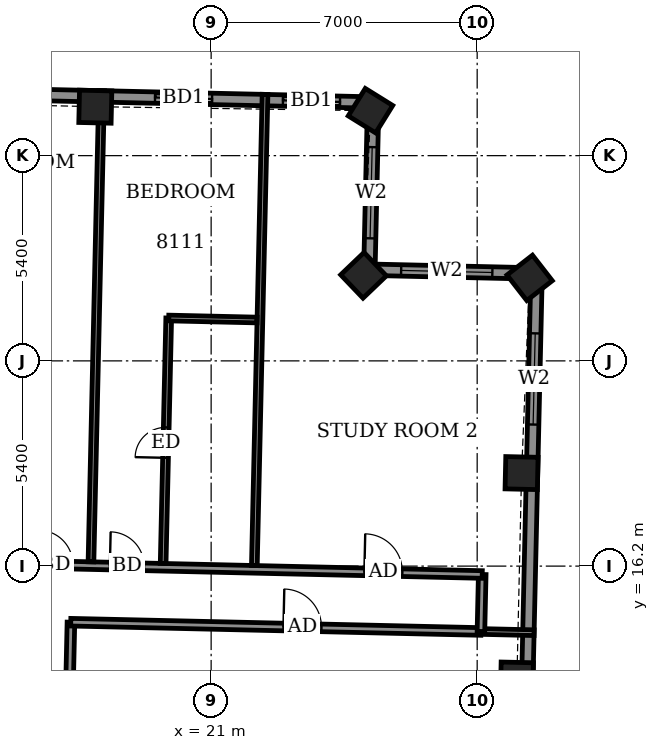
"""IFC4 building model, lengths in metres.
Left out: names, types, materials, properties, quantities, classifications, styles, units other than length and angle.
Written with IfcOpenShell. Run it as: python <this file> out.ifc"""

import sys

from ifc_helpers import new_model, si_unit, direction, frame, frame_2d, origin, origin_2d, place, context, subcontext, project, spatial, rectangle, extrude, element, fill, save


model = new_model("IFC4")
c1 = context("Model", 3, precision=1e-05, world=origin(), true_north=direction((0.0, 1.0)))
c2 = subcontext(c1, "Body", "Model", "MODEL_VIEW")
j1 = project(units=[si_unit("LENGTHUNIT", "METRE"), si_unit("PLANEANGLEUNIT", "RADIAN")], contexts=[c1])
p1 = place(None, origin())
s1 = spatial("IfcSite", under=j1, at=p1, CompositionType="ELEMENT")
p2 = place(p1, origin())
s2 = spatial("IfcBuilding", under=s1, at=p2, CompositionType="ELEMENT")
p3 = place(p2, frame((0.0, 0.0, 316.9)))
s3 = spatial("IfcBuildingStorey", under=s2, at=p3, CompositionType="ELEMENT", Elevation=316.9)
for number, where, z_axis, x_axis in (
    (1, (29.046, 13.242, -0.55), (0.0, 0.0, 1.0), (0.023, 1.0, 0.0)),
    (2, (29.168, 18.648, -0.55), (0.0, 0.0, 1.0), (0.023, 1.0, 0.0)),
    (3, (29.38, 23.784, -0.55), (0.0, 0.0, 1.0), (-0.613, 0.79, 0.0)),
    (4, (25.01, 23.851, -0.55), (0.0, 0.0, 1.0), (-0.691, 0.723, 0.0)),
    (5, (25.193, 28.183, -0.55), (0.0, 0.0, 1.0), (-0.849, 0.528, 0.0)),
    (6, (17.952, 28.288, -0.55), (0.0, 0.0, 1.0), (-1.0, 0.023, 0.0)),
):
    element("IfcColumn", number, at=place(p3, frame(where, z_axis=z_axis, x_axis=x_axis)), inside=s3, PredefinedType="COLUMN", context=c2, shape_type="SweptSolid", body=[
        extrude(rectangle(XDim=0.85, YDim=0.85, at=origin_2d()), origin(), (0.0, 0.0, 1.0), 3.6),
    ])
p4 = place(p3, frame((29.188, 7.404, 0.0), z_axis=(0.0, 0.0, 1.0), x_axis=(0.022728463996, 0.999741675096, 0.0)))
e7 = element("IfcWall", 7, at=p4, inside=s3, PredefinedType="SOLIDWALL", context=c2, shape_type="SweptSolid", body=[
    extrude(rectangle(XDim=16.499, YDim=0.3, at=frame_2d((8.25, 0.0))), origin(), (0.0, 0.0, 1.0), 2.55),
])
p5 = place(p4, frame((1.563, 0.0, 0.0)))
e8 = element("IfcOpeningElement", 8, at=p5, cuts=e7, PredefinedType="OPENING", context=c2, shape_type="SweptSolid", body=[
    extrude(rectangle(XDim=1.5, YDim=2.4, at=frame_2d((0.75, 1.2))), frame((0.0, 0.16, 0.0), z_axis=(0.0, -1.0, 0.0), x_axis=(1.0, 0.0, 0.0)), (0.0, 0.0, 1.0), 0.32),
])
p6 = place(p4, frame((4.367, 0.0, 0.9)))
e9 = element("IfcOpeningElement", 9, at=p6, cuts=e7, PredefinedType="OPENING", context=c2, shape_type="SweptSolid", body=[
    extrude(rectangle(XDim=0.9, YDim=1.5, at=frame_2d((0.45, 0.75))), frame((0.0, 0.16, 0.0), z_axis=(0.0, -1.0, 0.0), x_axis=(1.0, 0.0, 0.0)), (0.0, 0.0, 1.0), 0.32),
])
p7 = place(p4, frame((12.524, 0.0, 0.9)))
e10 = element("IfcOpeningElement", 10, at=p7, cuts=e7, PredefinedType="OPENING", context=c2, shape_type="SweptSolid", body=[
    extrude(rectangle(XDim=2.4, YDim=1.5, at=frame_2d((1.2, 0.75))), frame((0.0, 0.16, 0.0), z_axis=(0.0, -1.0, 0.0), x_axis=(1.0, 0.0, 0.0)), (0.0, 0.0, 1.0), 0.32),
])
p8 = place(p3, frame((29.563, 23.899, 0.0), z_axis=(0.0, 0.0, 1.0), x_axis=(-0.999741204967, 0.022749133868, 0.0)))
e11 = element("IfcWall", 11, at=p8, inside=s3, PredefinedType="SOLIDWALL", context=c2, shape_type="SweptSolid", body=[
    extrude(rectangle(XDim=4.4, YDim=0.3, at=frame_2d((2.2, 0.0))), origin(), (0.0, 0.0, 1.0), 2.55),
])
p9 = place(p8, frame((1.164, 0.0, 0.9)))
e12 = element("IfcOpeningElement", 12, at=p9, cuts=e11, PredefinedType="OPENING", context=c2, shape_type="SweptSolid", body=[
    extrude(rectangle(XDim=2.4, YDim=1.5, at=frame_2d((1.2, 0.75))), frame((0.0, 0.16, 0.0), z_axis=(0.0, -1.0, 0.0), x_axis=(1.0, 0.0, 0.0)), (0.0, 0.0, 1.0), 0.32),
])
p10 = place(p3, frame((25.164, 23.999, 0.0), z_axis=(0.0, 0.0, 1.0), x_axis=(0.02269871331, 0.999742351016, 0.0)))
e13 = element("IfcWall", 13, at=p10, inside=s3, PredefinedType="SOLIDWALL", context=c2, shape_type="SweptSolid", body=[
    extrude(rectangle(XDim=4.399, YDim=0.3, at=frame_2d((2.2, 0.0))), origin(), (0.0, 0.0, 1.0), 2.55),
])
p11 = place(p10, frame((0.826, 0.0, 0.9)))
e14 = element("IfcOpeningElement", 14, at=p11, cuts=e13, PredefinedType="OPENING", context=c2, shape_type="SweptSolid", body=[
    extrude(rectangle(XDim=2.4, YDim=1.5, at=frame_2d((1.2, 0.75))), frame((0.0, 0.16, 0.0), z_axis=(0.0, -1.0, 0.0), x_axis=(1.0, 0.0, 0.0)), (0.0, 0.0, 1.0), 0.32),
])
p12 = place(p3, frame((25.264, 28.397, 0.0), z_axis=(0.0, 0.0, 1.0), x_axis=(-0.999742391375, 0.022696935658, 0.0)))
e15 = element("IfcWall", 15, at=p12, inside=s3, PredefinedType="SOLIDWALL", context=c2, shape_type="SweptSolid", body=[
    extrude(rectangle(XDim=51.9, YDim=0.3, at=frame_2d((25.95, 0.0))), origin(), (0.0, 0.0, 1.0), 2.45),
])
p13 = place(p12, frame((0.874, 0.0, 0.0)))
e16 = element("IfcOpeningElement", 16, at=p13, cuts=e15, PredefinedType="OPENING", context=c2, shape_type="SweptSolid", body=[
    extrude(rectangle(XDim=1.5, YDim=2.4, at=frame_2d((0.75, 1.2))), frame((0.0, 0.16, 0.0), z_axis=(0.0, -1.0, 0.0), x_axis=(1.0, 0.0, 0.0)), (0.0, 0.0, 1.0), 0.32),
])
p14 = place(p12, frame((4.241, 0.0, 0.0)))
e17 = element("IfcOpeningElement", 17, at=p14, cuts=e15, PredefinedType="OPENING", context=c2, shape_type="SweptSolid", body=[
    extrude(rectangle(XDim=1.5, YDim=2.4, at=frame_2d((0.75, 1.2))), frame((0.0, 0.16, 0.0), z_axis=(0.0, -1.0, 0.0), x_axis=(1.0, 0.0, 0.0)), (0.0, 0.0, 1.0), 0.32),
])
p15 = place(p12, frame((8.691, 0.0, 0.0)))
e18 = element("IfcOpeningElement", 18, at=p15, cuts=e15, PredefinedType="OPENING", context=c2, shape_type="SweptSolid", body=[
    extrude(rectangle(XDim=1.5, YDim=2.4, at=frame_2d((0.75, 1.2))), frame((0.0, 0.16, 0.0), z_axis=(0.0, -1.0, 0.0), x_axis=(1.0, 0.0, 0.0)), (0.0, 0.0, 1.0), 0.32),
])
p16 = place(p12, frame((12.245, 0.0, 0.0)))
e19 = element("IfcOpeningElement", 19, at=p16, cuts=e15, PredefinedType="OPENING", context=c2, shape_type="SweptSolid", body=[
    extrude(rectangle(XDim=1.5, YDim=2.4, at=frame_2d((0.75, 1.2))), frame((0.0, 0.16, 0.0), z_axis=(0.0, -1.0, 0.0), x_axis=(1.0, 0.0, 0.0)), (0.0, 0.0, 1.0), 0.32),
])
p17 = place(p12, frame((17.25, 0.0, 0.0)))
e20 = element("IfcOpeningElement", 20, at=p17, cuts=e15, PredefinedType="OPENING", context=c2, shape_type="SweptSolid", body=[
    extrude(rectangle(XDim=1.5, YDim=2.4, at=frame_2d((0.75, 1.2))), frame((0.0, 0.16, 0.0), z_axis=(0.0, -1.0, 0.0), x_axis=(1.0, 0.0, 0.0)), (0.0, 0.0, 1.0), 0.32),
])
p18 = place(p12, frame((22.874, 0.0, 0.0)))
e21 = element("IfcOpeningElement", 21, at=p18, cuts=e15, PredefinedType="OPENING", context=c2, shape_type="SweptSolid", body=[
    extrude(rectangle(XDim=1.2, YDim=2.4, at=frame_2d((0.6, 1.2))), frame((0.0, 0.16, 0.0), z_axis=(0.0, -1.0, 0.0), x_axis=(1.0, 0.0, 0.0)), (0.0, 0.0, 1.0), 0.32),
])
p19 = place(p12, frame((26.1, 0.0, 0.0)))
e22 = element("IfcOpeningElement", 22, at=p19, cuts=e15, PredefinedType="OPENING", context=c2, shape_type="SweptSolid", body=[
    extrude(rectangle(XDim=1.5, YDim=2.4, at=frame_2d((0.75, 1.2))), frame((0.0, 0.16, 0.0), z_axis=(0.0, -1.0, 0.0), x_axis=(1.0, 0.0, 0.0)), (0.0, 0.0, 1.0), 0.32),
])
p20 = place(p12, frame((30.977, 0.0, 0.0)))
e23 = element("IfcOpeningElement", 23, at=p20, cuts=e15, PredefinedType="OPENING", context=c2, shape_type="SweptSolid", body=[
    extrude(rectangle(XDim=1.5, YDim=2.4, at=frame_2d((0.75, 1.2))), frame((0.0, 0.16, 0.0), z_axis=(0.0, -1.0, 0.0), x_axis=(1.0, 0.0, 0.0)), (0.0, 0.0, 1.0), 0.32),
])
p21 = place(p12, frame((34.53, 0.0, 0.0)))
e24 = element("IfcOpeningElement", 24, at=p21, cuts=e15, PredefinedType="OPENING", context=c2, shape_type="SweptSolid", body=[
    extrude(rectangle(XDim=1.5, YDim=2.4, at=frame_2d((0.75, 1.2))), frame((0.0, 0.16, 0.0), z_axis=(0.0, -1.0, 0.0), x_axis=(1.0, 0.0, 0.0)), (0.0, 0.0, 1.0), 0.32),
])
p22 = place(p12, frame((39.425, 0.0, 0.0)))
e25 = element("IfcOpeningElement", 25, at=p22, cuts=e15, PredefinedType="OPENING", context=c2, shape_type="SweptSolid", body=[
    extrude(rectangle(XDim=1.5, YDim=2.4, at=frame_2d((0.75, 1.2))), frame((0.0, 0.16, 0.0), z_axis=(0.0, -1.0, 0.0), x_axis=(1.0, 0.0, 0.0)), (0.0, 0.0, 1.0), 0.32),
])
p23 = place(p12, frame((45.259, 0.0, 0.0)))
e26 = element("IfcOpeningElement", 26, at=p23, cuts=e15, PredefinedType="OPENING", context=c2, shape_type="SweptSolid", body=[
    extrude(rectangle(XDim=1.2, YDim=2.4, at=frame_2d((0.6, 1.2))), frame((0.0, 0.16, 0.0), z_axis=(0.0, -1.0, 0.0), x_axis=(1.0, 0.0, 0.0)), (0.0, 0.0, 1.0), 0.32),
])
p24 = place(p12, frame((47.987, 0.0, 0.9)))
e27 = element("IfcOpeningElement", 27, at=p24, cuts=e15, PredefinedType="OPENING", context=c2, shape_type="SweptSolid", body=[
    extrude(rectangle(XDim=2.4, YDim=1.5, at=frame_2d((1.2, 0.75))), frame((0.0, 0.16, 0.0), z_axis=(0.0, -1.0, 0.0), x_axis=(1.0, 0.0, 0.0)), (0.0, 0.0, 1.0), 0.32),
])
p25 = place(p3, frame((17.157, 7.898, 0.0), z_axis=(0.0, 0.0, 1.0), x_axis=(0.022562209343, 0.999745440955, 0.0)))
e28 = element("IfcWall", 28, at=p25, inside=s3, PredefinedType="PARTITIONING", context=c2, shape_type="SweptSolid", body=[
    extrude(rectangle(XDim=6.828, YDim=0.2, at=frame_2d((3.414, 0.0))), origin(), (0.0, 0.0, 1.0), 3.05),
])
p26 = place(p25, frame((1.504, 0.0, 0.0)))
e29 = element("IfcOpeningElement", 29, at=p26, cuts=e28, PredefinedType="OPENING", context=c2, shape_type="SweptSolid", body=[
    extrude(rectangle(XDim=1.0, YDim=2.1, at=frame_2d((0.5, 1.05))), frame((0.0, 0.11, 0.0), z_axis=(0.0, -1.0, 0.0), x_axis=(1.0, 0.0, 0.0)), (0.0, 0.0, 1.0), 0.22),
])
p27 = place(p3, frame((17.306, 14.724, 0.0), z_axis=(0.0, 0.0, 1.0), x_axis=(0.999744269809, -0.022614043969, 0.0)))
e30 = element("IfcWall", 30, at=p27, inside=s3, PredefinedType="PARTITIONING", context=c2, shape_type="SweptSolid", body=[
    extrude(rectangle(XDim=10.796, YDim=0.2, at=frame_2d((5.398, 0.0))), origin(), (0.0, 0.0, 1.0), 3.05),
])
p28 = place(p27, frame((5.598, 0.0, 0.0)))
e31 = element("IfcOpeningElement", 31, at=p28, cuts=e30, PredefinedType="OPENING", context=c2, shape_type="SweptSolid", body=[
    extrude(rectangle(XDim=1.0, YDim=2.1, at=frame_2d((0.5, 1.05))), frame((0.0, 0.11, 0.0), z_axis=(0.0, -1.0, 0.0), x_axis=(1.0, 0.0, 0.0)), (0.0, 0.0, 1.0), 0.22),
])
p29 = place(p3, frame((28.099, 14.48, 0.0), z_axis=(0.0, 0.0, 1.0), x_axis=(0.999738763928, -0.022856156732, 0.0)))
e32 = element("IfcWall", 32, at=p29, inside=s3, PredefinedType="PARTITIONING", context=c2, shape_type="SweptSolid", body=[
    extrude(rectangle(XDim=1.399, YDim=0.15, at=frame_2d((0.7, 0.0))), origin(), (0.0, 0.0, 1.0), 2.55),
])
p30 = place(p3, frame((28.099, 14.48, 0.0), z_axis=(0.0, 0.0, 1.0), x_axis=(0.022632637625, 0.99974384905, 0.0)))
e33 = element("IfcWall", 33, at=p30, inside=s3, PredefinedType="PARTITIONING", context=c2, shape_type="SweptSolid", body=[
    extrude(rectangle(XDim=1.5, YDim=0.2, at=frame_2d((0.75, 0.0))), origin(), (0.0, 0.0, 1.0), 3.05),
])
p31 = place(p3, frame((-30.652, 17.313, 0.0), z_axis=(0.0, 0.0, 1.0), x_axis=(0.999742623764, -0.02268669719, 0.0)))
e34 = element("IfcWall", 34, at=p31, inside=s3, PredefinedType="PARTITIONING", context=c2, shape_type="SweptSolid", body=[
    extrude(rectangle(XDim=58.8, YDim=0.2, at=frame_2d((29.4, 0.0))), origin(), (0.0, 0.0, 1.0), 3.05),
])
p32 = place(p31, frame((55.698, 0.0, 0.0)))
e35 = element("IfcOpeningElement", 35, at=p32, cuts=e34, PredefinedType="OPENING", context=c2, shape_type="SweptSolid", body=[
    extrude(rectangle(XDim=1.0, YDim=2.1, at=frame_2d((0.5, 1.05))), frame((0.0, 0.11, 0.0), z_axis=(0.0, -1.0, 0.0), x_axis=(1.0, 0.0, 0.0)), (0.0, 0.0, 1.0), 0.22),
])
p33 = place(p31, frame((49.0, 0.0, 0.0)))
e36 = element("IfcOpeningElement", 36, at=p33, cuts=e34, PredefinedType="OPENING", context=c2, shape_type="SweptSolid", body=[
    extrude(rectangle(XDim=0.9, YDim=2.1, at=frame_2d((0.45, 1.05))), frame((0.0, 0.11, 0.0), z_axis=(0.0, -1.0, 0.0), x_axis=(1.0, 0.0, 0.0)), (0.0, 0.0, 1.0), 0.22),
])
p34 = place(p31, frame((47.125, 0.0, 0.0)))
e37 = element("IfcOpeningElement", 37, at=p34, cuts=e34, PredefinedType="OPENING", context=c2, shape_type="SweptSolid", body=[
    extrude(rectangle(XDim=0.9, YDim=2.1, at=frame_2d((0.45, 1.05))), frame((0.0, 0.11, 0.0), z_axis=(0.0, -1.0, 0.0), x_axis=(1.0, 0.0, 0.0)), (0.0, 0.0, 1.0), 0.22),
])
p35 = place(p31, frame((40.425, 0.0, 0.0)))
e38 = element("IfcOpeningElement", 38, at=p35, cuts=e34, PredefinedType="OPENING", context=c2, shape_type="SweptSolid", body=[
    extrude(rectangle(XDim=0.9, YDim=2.1, at=frame_2d((0.45, 1.05))), frame((0.0, 0.11, 0.0), z_axis=(0.0, -1.0, 0.0), x_axis=(1.0, 0.0, 0.0)), (0.0, 0.0, 1.0), 0.22),
])
p36 = place(p31, frame((38.4, 0.0, 0.0)))
e39 = element("IfcOpeningElement", 39, at=p36, cuts=e34, PredefinedType="OPENING", context=c2, shape_type="SweptSolid", body=[
    extrude(rectangle(XDim=0.9, YDim=2.1, at=frame_2d((0.45, 1.05))), frame((0.0, 0.11, 0.0), z_axis=(0.0, -1.0, 0.0), x_axis=(1.0, 0.0, 0.0)), (0.0, 0.0, 1.0), 0.22),
])
p37 = place(p31, frame((31.6, 0.0, 0.0)))
e40 = element("IfcOpeningElement", 40, at=p37, cuts=e34, PredefinedType="OPENING", context=c2, shape_type="SweptSolid", body=[
    extrude(rectangle(XDim=0.9, YDim=2.1, at=frame_2d((0.45, 1.05))), frame((0.0, 0.11, 0.0), z_axis=(0.0, -1.0, 0.0), x_axis=(1.0, 0.0, 0.0)), (0.0, 0.0, 1.0), 0.22),
])
p38 = place(p31, frame((29.55, 0.0, 0.0)))
e41 = element("IfcOpeningElement", 41, at=p38, cuts=e34, PredefinedType="OPENING", context=c2, shape_type="SweptSolid", body=[
    extrude(rectangle(XDim=0.9, YDim=2.1, at=frame_2d((0.45, 1.05))), frame((0.0, 0.11, 0.0), z_axis=(0.0, -1.0, 0.0), x_axis=(1.0, 0.0, 0.0)), (0.0, 0.0, 1.0), 0.22),
])
p39 = place(p31, frame((22.625, 0.0, 0.0)))
e42 = element("IfcOpeningElement", 42, at=p39, cuts=e34, PredefinedType="OPENING", context=c2, shape_type="SweptSolid", body=[
    extrude(rectangle(XDim=0.9, YDim=2.1, at=frame_2d((0.45, 1.05))), frame((0.0, 0.11, 0.0), z_axis=(0.0, -1.0, 0.0), x_axis=(1.0, 0.0, 0.0)), (0.0, 0.0, 1.0), 0.22),
])
p40 = place(p31, frame((20.625, 0.0, 0.0)))
e43 = element("IfcOpeningElement", 43, at=p40, cuts=e34, PredefinedType="OPENING", context=c2, shape_type="SweptSolid", body=[
    extrude(rectangle(XDim=0.9, YDim=2.1, at=frame_2d((0.45, 1.05))), frame((0.0, 0.11, 0.0), z_axis=(0.0, -1.0, 0.0), x_axis=(1.0, 0.0, 0.0)), (0.0, 0.0, 1.0), 0.22),
])
p41 = place(p31, frame((13.825, 0.0, 0.0)))
e44 = element("IfcOpeningElement", 44, at=p41, cuts=e34, PredefinedType="OPENING", context=c2, shape_type="SweptSolid", body=[
    extrude(rectangle(XDim=0.9, YDim=2.1, at=frame_2d((0.45, 1.05))), frame((0.0, 0.11, 0.0), z_axis=(0.0, -1.0, 0.0), x_axis=(1.0, 0.0, 0.0)), (0.0, 0.0, 1.0), 0.22),
])
p42 = place(p31, frame((11.725, 0.0, 0.0)))
e45 = element("IfcOpeningElement", 45, at=p42, cuts=e34, PredefinedType="OPENING", context=c2, shape_type="SweptSolid", body=[
    extrude(rectangle(XDim=0.9, YDim=2.1, at=frame_2d((0.45, 1.05))), frame((0.0, 0.11, 0.0), z_axis=(0.0, -1.0, 0.0), x_axis=(1.0, 0.0, 0.0)), (0.0, 0.0, 1.0), 0.22),
])
p43 = place(p31, frame((1.85, 0.0, 0.0)))
e46 = element("IfcOpeningElement", 46, at=p43, cuts=e34, PredefinedType="OPENING", context=c2, shape_type="SweptSolid", body=[
    extrude(rectangle(XDim=1.0, YDim=2.1, at=frame_2d((0.5, 1.05))), frame((0.0, 0.11, 0.0), z_axis=(0.0, -1.0, 0.0), x_axis=(1.0, 0.0, 0.0)), (0.0, 0.0, 1.0), 0.22),
])
p44 = place(p31, frame((6.95, 0.0, 0.0)))
e47 = element("IfcOpeningElement", 47, at=p44, cuts=e34, PredefinedType="OPENING", context=c2, shape_type="SweptSolid", body=[
    extrude(rectangle(XDim=0.9, YDim=2.1, at=frame_2d((0.45, 1.05))), frame((0.0, 0.11, 0.0), z_axis=(0.0, -1.0, 0.0), x_axis=(1.0, 0.0, 0.0)), (0.0, 0.0, 1.0), 0.22),
])
p45 = place(p3, frame((17.838, 16.313, 0.0), z_axis=(0.0, 0.0, 1.0), x_axis=(0.022661475803, 0.999743195783, 0.0)))
e48 = element("IfcWall", 48, at=p45, inside=s3, PredefinedType="PARTITIONING", context=c2, shape_type="SweptSolid", body=[
    extrude(rectangle(XDim=12.4, YDim=0.15, at=frame_2d((6.2, 0.0))), origin(), (0.0, 0.0, 1.0), 3.05),
])
p46 = place(p3, frame((19.737, 16.27, 0.0), z_axis=(0.0, 0.0, 1.0), x_axis=(0.022752312182, 0.999741132639, 0.0)))
e49 = element("IfcWall", 49, at=p46, inside=s3, PredefinedType="PARTITIONING", context=c2, shape_type="SweptSolid", body=[
    extrude(rectangle(XDim=6.46, YDim=0.15, at=frame_2d((3.23, 0.0))), origin(), (0.0, 0.0, 1.0), 3.05),
])
p47 = place(p46, frame((2.78, 0.0, 0.0)))
e50 = element("IfcOpeningElement", 50, at=p47, cuts=e49, PredefinedType="OPENING", context=c2, shape_type="SweptSolid", body=[
    extrude(rectangle(XDim=0.8, YDim=2.1, at=frame_2d((0.4, 1.05))), frame((0.0, 0.085, 0.0), z_axis=(0.0, -1.0, 0.0), x_axis=(1.0, 0.0, 0.0)), (0.0, 0.0, 1.0), 0.17),
])
p48 = place(p3, frame((22.137, 16.215, 0.0), z_axis=(0.0, 0.0, 1.0), x_axis=(0.022661475803, 0.999743195783, 0.0)))
e51 = element("IfcWall", 51, at=p48, inside=s3, PredefinedType="PARTITIONING", context=c2, shape_type="SweptSolid", body=[
    extrude(rectangle(XDim=12.4, YDim=0.15, at=frame_2d((6.2, 0.0))), origin(), (0.0, 0.0, 1.0), 2.5),
])
p49 = place(p3, frame((19.884, 22.728, 0.0), z_axis=(0.0, 0.0, 1.0), x_axis=(0.999740260747, -0.02279059109, 0.0)))
e52 = element("IfcWall", 52, at=p49, inside=s3, PredefinedType="PARTITIONING", context=c2, shape_type="SweptSolid", body=[
    extrude(rectangle(XDim=2.324, YDim=0.15, at=frame_2d((1.162, 0.0))), origin(), (0.0, 0.0, 1.0), 3.05),
])
p50 = place(p7, origin())
e53 = element("IfcWindow", 53, at=p50, inside=s3, PartitioningType="DOUBLE_PANEL_VERTICAL", PredefinedType="WINDOW", context=c2, shape_type="SweptSolid", body=[
    extrude(rectangle(XDim=2.4, YDim=1.5, at=frame_2d((1.2, 0.75))), frame((0.0, 0.03, 0.0), z_axis=(0.0, -1.0, 0.0), x_axis=(1.0, 0.0, 0.0)), (0.0, 0.0, 1.0), 0.06),
])
fill(e10, e53)
p51 = place(p9, origin())
e54 = element("IfcWindow", 54, at=p51, inside=s3, PartitioningType="DOUBLE_PANEL_VERTICAL", PredefinedType="WINDOW", context=c2, shape_type="SweptSolid", body=[
    extrude(rectangle(XDim=2.4, YDim=1.5, at=frame_2d((1.2, 0.75))), frame((0.0, 0.03, 0.0), z_axis=(0.0, -1.0, 0.0), x_axis=(1.0, 0.0, 0.0)), (0.0, 0.0, 1.0), 0.06),
])
fill(e12, e54)
p52 = place(p11, origin())
e55 = element("IfcWindow", 55, at=p52, inside=s3, PartitioningType="DOUBLE_PANEL_VERTICAL", PredefinedType="WINDOW", context=c2, shape_type="SweptSolid", body=[
    extrude(rectangle(XDim=2.4, YDim=1.5, at=frame_2d((1.2, 0.75))), frame((0.0, 0.03, 0.0), z_axis=(0.0, -1.0, 0.0), x_axis=(1.0, 0.0, 0.0)), (0.0, 0.0, 1.0), 0.06),
])
fill(e14, e55)
p53 = place(p13, origin())
e56 = element("IfcDoor", 56, at=p53, inside=s3, OperationType="SLIDING_TO_LEFT", PredefinedType="DOOR", context=c2, shape_type="SweptSolid", body=[
    extrude(rectangle(XDim=1.5, YDim=2.4, at=frame_2d((0.75, 1.2))), frame((0.0, 0.025, 0.0), z_axis=(0.0, -1.0, 0.0), x_axis=(1.0, 0.0, 0.0)), (0.0, 0.0, 1.0), 0.05),
])
fill(e16, e56)
p54 = place(p14, origin())
e57 = element("IfcDoor", 57, at=p54, inside=s3, OperationType="SLIDING_TO_LEFT", PredefinedType="DOOR", context=c2, shape_type="SweptSolid", body=[
    extrude(rectangle(XDim=1.5, YDim=2.4, at=frame_2d((0.75, 1.2))), frame((0.0, 0.025, 0.0), z_axis=(0.0, -1.0, 0.0), x_axis=(1.0, 0.0, 0.0)), (0.0, 0.0, 1.0), 0.05),
])
fill(e17, e57)
p55 = place(p28, origin())
e58 = element("IfcDoor", 58, at=p55, inside=s3, OperationType="SINGLE_SWING_RIGHT", PredefinedType="DOOR", context=c2, shape_type="SweptSolid", body=[
    extrude(rectangle(XDim=1.0, YDim=2.1, at=frame_2d((0.5, 1.05))), frame((0.0, 0.025, 0.0), z_axis=(0.0, -1.0, 0.0), x_axis=(1.0, 0.0, 0.0)), (0.0, 0.0, 1.0), 0.05),
])
fill(e31, e58)
p56 = place(p32, origin())
e59 = element("IfcDoor", 59, at=p56, inside=s3, OperationType="SINGLE_SWING_LEFT", PredefinedType="DOOR", context=c2, shape_type="SweptSolid", body=[
    extrude(rectangle(XDim=1.0, YDim=2.1, at=frame_2d((0.5, 1.05))), frame((0.0, 0.025, 0.0), z_axis=(0.0, -1.0, 0.0), x_axis=(1.0, 0.0, 0.0)), (0.0, 0.0, 1.0), 0.05),
])
fill(e35, e59)
p57 = place(p33, origin())
e60 = element("IfcDoor", 60, at=p57, inside=s3, OperationType="SINGLE_SWING_LEFT", PredefinedType="DOOR", context=c2, shape_type="SweptSolid", body=[
    extrude(rectangle(XDim=0.9, YDim=2.1, at=frame_2d((0.45, 1.05))), frame((0.0, 0.025, 0.0), z_axis=(0.0, -1.0, 0.0), x_axis=(1.0, 0.0, 0.0)), (0.0, 0.0, 1.0), 0.05),
])
fill(e36, e60)
p58 = place(p47, origin())
e61 = element("IfcDoor", 61, at=p58, inside=s3, OperationType="SINGLE_SWING_LEFT", PredefinedType="DOOR", context=c2, shape_type="SweptSolid", body=[
    extrude(rectangle(XDim=0.8, YDim=2.1, at=frame_2d((0.4, 1.05))), frame((0.0, 0.025, 0.0), z_axis=(0.0, -1.0, 0.0), x_axis=(1.0, 0.0, 0.0)), (0.0, 0.0, 1.0), 0.05),
])
fill(e50, e61)
p59 = place(p34, origin())
e62 = element("IfcDoor", 62, at=p59, inside=s3, OperationType="SINGLE_SWING_RIGHT", PredefinedType="DOOR", context=c2, shape_type="SweptSolid", body=[
    extrude(rectangle(XDim=0.9, YDim=2.1, at=frame_2d((0.45, 1.05))), frame((0.0, 0.025, 0.0), z_axis=(0.0, -1.0, 0.0), x_axis=(1.0, 0.0, 0.0)), (0.0, 0.0, 1.0), 0.05),
])
fill(e37, e62)
save(model, sys.argv[1])
